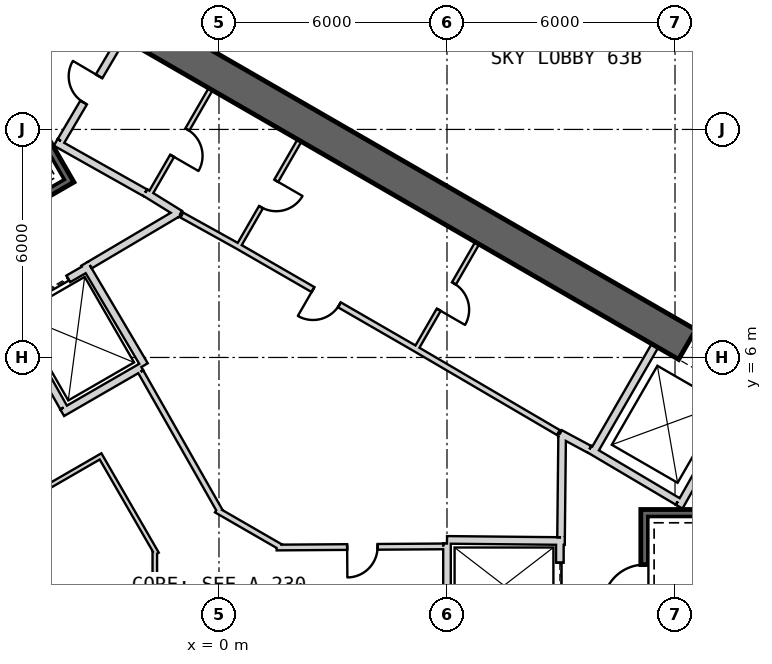
"""IFC4 building model, lengths in metres.
Left out: names, types, materials, properties, quantities, classifications, styles, units other than length and angle.
Written with IfcOpenShell. Run it as: python <this file> out.ifc"""

import sys

from ifc_helpers import new_model, si_unit, direction, frame, frame_2d, origin, place, context, subcontext, project, spatial, rectangle, extrude, element, fill, save


model = new_model("IFC4")
c1 = context("Model", 3, precision=1e-05, world=origin(), true_north=direction((0.0, 1.0)))
c2 = subcontext(c1, "Body", "Model", "MODEL_VIEW")
j1 = project(units=[si_unit("LENGTHUNIT", "METRE"), si_unit("PLANEANGLEUNIT", "RADIAN")], contexts=[c1])
p1 = place(None, origin())
s1 = spatial("IfcSite", under=j1, at=p1, CompositionType="ELEMENT")
p2 = place(p1, origin())
s2 = spatial("IfcBuilding", under=s1, at=p2, CompositionType="ELEMENT")
p3 = place(p2, frame((0.0, 0.0, 277.2)))
s3 = spatial("IfcBuildingStorey", under=s2, at=p3, CompositionType="ELEMENT", Elevation=277.2)
p4 = place(p3, frame((19.475, 2.208, 0.0), z_axis=(0.0, 0.0, 1.0), x_axis=(-0.866028369851, 0.499994862586, 0.0)))
e1 = element("IfcWall", 1, at=p4, inside=s3, PredefinedType="SHEAR", context=c2, shape_type="SweptSolid", body=[
    extrude(rectangle(XDim=31.523, YDim=0.9, at=frame_2d((15.762, 0.0))), origin(), (0.0, 0.0, 1.0), 6.5),
])
p5 = place(p4, frame((7.062, 0.0, 0.0)))
e2 = element("IfcOpeningElement", 2, at=p5, cuts=e1, PredefinedType="OPENING", context=c2, shape_type="SweptSolid", body=[
    extrude(rectangle(XDim=1.2, YDim=2.4, at=frame_2d((0.6, 1.2))), frame((0.0, 0.46, 0.0), z_axis=(0.0, -1.0, 0.0), x_axis=(1.0, 0.0, 0.0)), (0.0, 0.0, 1.0), 0.92),
])
p6 = place(p4, frame((3.612, 0.0, 0.0)))
e3 = element("IfcOpeningElement", 3, at=p6, cuts=e1, PredefinedType="OPENING", context=c2, shape_type="SweptSolid", body=[
    extrude(rectangle(XDim=1.2, YDim=2.4, at=frame_2d((0.6, 1.2))), frame((0.0, 0.46, 0.0), z_axis=(0.0, -1.0, 0.0), x_axis=(1.0, 0.0, 0.0)), (0.0, 0.0, 1.0), 0.92),
])
p7 = place(p4, frame((26.712, 0.0, 0.0)))
e4 = element("IfcOpeningElement", 4, at=p7, cuts=e1, PredefinedType="OPENING", context=c2, shape_type="SweptSolid", body=[
    extrude(rectangle(XDim=1.2, YDim=2.4, at=frame_2d((0.6, 1.2))), frame((0.0, 0.46, 0.0), z_axis=(0.0, -1.0, 0.0), x_axis=(1.0, 0.0, 0.0)), (0.0, 0.0, 1.0), 0.92),
])
p8 = place(p3, frame((9.847, 3.495, 0.0), z_axis=(0.0, 0.0, 1.0), x_axis=(0.499984717929, 0.866034226713, 0.0)))
e5 = element("IfcWall", 5, at=p8, inside=s3, PredefinedType="PLUMBINGWALL", context=c2, shape_type="SweptSolid", body=[
    extrude(rectangle(XDim=3.25, YDim=0.2, at=frame_2d((1.625, 0.0))), origin(), (0.0, 0.0, 1.0), 6.1),
])
p9 = place(p3, frame((12.11, 2.073, 0.0), z_axis=(0.0, 0.0, 1.0), x_axis=(0.49196600604, 0.870614408852, 0.0)))
e6 = element("IfcWall", 6, at=p9, inside=s3, PredefinedType="PLUMBINGWALL", context=c2, shape_type="SweptSolid", body=[
    extrude(rectangle(XDim=3.35, YDim=0.2, at=frame_2d((1.675, 0.0))), origin(), (0.0, 0.0, 1.0), 6.1),
])
p10 = place(p3, frame((12.073, 2.211, 0.0), z_axis=(0.0, 0.0, 1.0), x_axis=(-0.860414880418, 0.509594185166, 0.0)))
e7 = element("IfcWall", 7, at=p10, inside=s3, PredefinedType="PLUMBINGWALL", context=c2, shape_type="SweptSolid", body=[
    extrude(rectangle(XDim=2.7, YDim=0.2, at=frame_2d((1.35, 0.0))), origin(), (0.0, 0.0, 1.0), 6.1),
])
p11 = place(p3, frame((19.2, 1.9, -0.35), z_axis=(0.0, 0.0, 1.0), x_axis=(-1.0, 0.0, 0.0)))
e8 = element("IfcWall", 8, at=p11, inside=s3, PredefinedType="SHEAR", context=c2, shape_type="SweptSolid", body=[
    extrude(rectangle(XDim=8.1, YDim=0.2, at=frame_2d((4.05, 0.0))), origin(), (0.0, 0.0, 1.0), 6.45),
])
p12 = place(p3, frame((11.2, -1.8, -0.35), z_axis=(0.0, 0.0, 1.0), x_axis=(0.0, 1.0, 0.0)))
e9 = element("IfcWall", 9, at=p12, inside=s3, PredefinedType="SHEAR", context=c2, shape_type="SweptSolid", body=[
    extrude(rectangle(XDim=3.6, YDim=0.2, at=frame_2d((1.8, 0.0))), origin(), (0.0, 0.0, 1.0), 6.45),
])
p13 = place(p12, frame((1.25, 0.0, 0.35)))
e10 = element("IfcOpeningElement", 10, at=p13, cuts=e9, PredefinedType="OPENING", context=c2, shape_type="SweptSolid", body=[
    extrude(rectangle(XDim=1.1, YDim=2.1, at=frame_2d((0.55, 1.05))), frame((0.0, 0.11, 0.0), z_axis=(0.0, -1.0, 0.0), x_axis=(1.0, 0.0, 0.0)), (0.0, 0.0, 1.0), 0.22),
])
p14 = place(p3, frame((8.97, 1.2, 0.0), z_axis=(0.0, 0.0, 1.0), x_axis=(0.0, -1.0, 0.0)))
e11 = element("IfcWall", 11, at=p14, inside=s3, PredefinedType="PLUMBINGWALL", context=c2, shape_type="SweptSolid", body=[
    extrude(rectangle(XDim=2.4, YDim=0.2, at=frame_2d((1.2, 0.0))), origin(), (0.0, 0.0, 1.0), 6.1),
])
p15 = place(p14, frame((0.6, 0.0, 0.0)))
e12 = element("IfcOpeningElement", 12, at=p15, cuts=e11, PredefinedType="OPENING", context=c2, shape_type="SweptSolid", body=[
    extrude(rectangle(XDim=1.2, YDim=2.4, at=frame_2d((0.6, 1.2))), frame((0.0, 0.11, 0.0), z_axis=(0.0, -1.0, 0.0), x_axis=(1.0, 0.0, 0.0)), (0.0, 0.0, 1.0), 0.22),
])
p16 = place(p3, frame((6.0, 1.2, 0.0), z_axis=(0.0, 0.0, 1.0), x_axis=(0.999949988, -0.010001074852, 0.0)))
e13 = element("IfcWall", 13, at=p16, inside=s3, PredefinedType="PLUMBINGWALL", context=c2, shape_type="SweptSolid", body=[
    extrude(rectangle(XDim=3.1, YDim=0.2, at=frame_2d((1.55, 0.0))), origin(), (0.0, 0.0, 1.0), 6.1),
])
p17 = place(p3, frame((6.0, -1.1, 0.0), z_axis=(0.0, 0.0, 1.0), x_axis=(0.0, 1.0, 0.0)))
e14 = element("IfcWall", 14, at=p17, inside=s3, PredefinedType="PLUMBINGWALL", context=c2, shape_type="SweptSolid", body=[
    extrude(rectangle(XDim=2.205, YDim=0.2, at=frame_2d((1.102, 0.0))), origin(), (0.0, 0.0, 1.0), 6.1),
])
p18 = place(p3, frame((-7.854, 17.405, -0.35), z_axis=(0.0, 0.0, 1.0), x_axis=(0.499997992926, -0.866026562566, 0.0)))
e15 = element("IfcWall", 15, at=p18, inside=s3, PredefinedType="SHEAR", context=c2, shape_type="SweptSolid", body=[
    extrude(rectangle(XDim=7.9, YDim=0.2, at=frame_2d((3.95, 0.0))), origin(), (0.0, 0.0, 1.0), 6.45),
])
p19 = place(p3, frame((-7.159, 8.8, -0.35), z_axis=(0.0, 0.0, 1.0), x_axis=(0.866047807691, 0.499961193289, 0.0)))
e16 = element("IfcWall", 16, at=p19, inside=s3, PredefinedType="SHEAR", context=c2, shape_type="SweptSolid", body=[
    extrude(rectangle(XDim=3.6, YDim=0.2, at=frame_2d((1.8, 0.0))), origin(), (0.0, 0.0, 1.0), 6.45),
])
p20 = place(p19, frame((1.25, 0.0, 0.35)))
e17 = element("IfcOpeningElement", 17, at=p20, cuts=e16, PredefinedType="OPENING", context=c2, shape_type="SweptSolid", body=[
    extrude(rectangle(XDim=1.1, YDim=2.1, at=frame_2d((0.55, 1.05))), frame((0.0, 0.11, 0.0), z_axis=(0.0, -1.0, 0.0), x_axis=(1.0, 0.0, 0.0)), (0.0, 0.0, 1.0), 0.22),
])
p21 = place(p3, frame((-5.524, 7.168, 0.0), z_axis=(0.0, 0.0, 1.0), x_axis=(0.866024647952, 0.500001309137, 0.0)))
e18 = element("IfcWall", 18, at=p21, inside=s3, PredefinedType="PLUMBINGWALL", context=c2, shape_type="SweptSolid", body=[
    extrude(rectangle(XDim=2.4, YDim=0.2, at=frame_2d((1.2, 0.0))), origin(), (0.0, 0.0, 1.0), 6.1),
])
p22 = place(p21, frame((0.6, 0.0, 0.0)))
e19 = element("IfcOpeningElement", 19, at=p22, cuts=e18, PredefinedType="OPENING", context=c2, shape_type="SweptSolid", body=[
    extrude(rectangle(XDim=1.2, YDim=2.4, at=frame_2d((0.6, 1.2))), frame((0.0, 0.11, 0.0), z_axis=(0.0, -1.0, 0.0), x_axis=(1.0, 0.0, 0.0)), (0.0, 0.0, 1.0), 0.22),
])
p23 = place(p3, frame((-3.538, 8.465, 0.0), z_axis=(0.0, 0.0, 1.0), x_axis=(0.508647062354, -0.860975125052, 0.0)))
e20 = element("IfcWall", 20, at=p23, inside=s3, PredefinedType="PLUMBINGWALL", context=c2, shape_type="SweptSolid", body=[
    extrude(rectangle(XDim=3.1, YDim=0.2, at=frame_2d((1.55, 0.0))), origin(), (0.0, 0.0, 1.0), 6.1),
])
p24 = place(p3, frame((-2.043, 5.748, 0.0), z_axis=(0.0, 0.0, 1.0), x_axis=(-0.866035096217, -0.499983211839, 0.0)))
e21 = element("IfcWall", 21, at=p24, inside=s3, PredefinedType="PLUMBINGWALL", context=c2, shape_type="SweptSolid", body=[
    extrude(rectangle(XDim=2.404, YDim=0.2, at=frame_2d((1.202, 0.0))), origin(), (0.0, 0.0, 1.0), 6.1),
])
p25 = place(p3, frame((-5.562, 7.296, 0.0), z_axis=(0.0, 0.0, 1.0), x_axis=(0.49134651263, -0.870964180966, 0.0)))
e22 = element("IfcWall", 22, at=p25, inside=s3, PredefinedType="PLUMBINGWALL", context=c2, shape_type="SweptSolid", body=[
    extrude(rectangle(XDim=3.0, YDim=0.2, at=frame_2d((1.5, 0.0))), origin(), (0.0, 0.0, 1.0), 6.1),
])
p26 = place(p3, frame((6.795, 9.01, 0.0), z_axis=(0.0, 0.0, 1.0), x_axis=(-0.499984717929, -0.866034226713, 0.0)))
e23 = element("IfcWall", 23, at=p26, inside=s3, PredefinedType="PARTITIONING", context=c2, shape_type="SweptSolid", body=[
    extrude(rectangle(XDim=3.25, YDim=0.12, at=frame_2d((1.625, 0.0))), origin(), (0.0, 0.0, 1.0), 6.1),
])
p27 = place(p26, frame((1.225, 0.0, 0.0)))
e24 = element("IfcOpeningElement", 24, at=p27, cuts=e23, PredefinedType="OPENING", context=c2, shape_type="SweptSolid", body=[
    extrude(rectangle(XDim=0.8, YDim=2.1, at=frame_2d((0.4, 1.05))), frame((0.0, 0.07, 0.0), z_axis=(0.0, -1.0, 0.0), x_axis=(1.0, 0.0, 0.0)), (0.0, 0.0, 1.0), 0.14),
])
p28 = place(p3, frame((8.974, 3.999, 0.0), z_axis=(0.0, 0.0, 1.0), x_axis=(0.880917147855, -0.473270513147, 0.0)))
e25 = element("IfcWall", 25, at=p28, inside=s3, PredefinedType="PARTITIONING", context=c2, shape_type="SweptSolid", body=[
    extrude(rectangle(XDim=0.878, YDim=0.2, at=frame_2d((0.439, 0.0))), origin(), (0.0, 0.0, 1.0), 6.1),
])
p29 = place(p3, frame((8.931, 4.025, 0.0), z_axis=(0.0, 0.0, 1.0), x_axis=(-0.862666884027, 0.505772525157, 0.0)))
e26 = element("IfcWall", 26, at=p29, inside=s3, PredefinedType="PLUMBINGWALL", context=c2, shape_type="SweptSolid", body=[
    extrude(rectangle(XDim=4.372, YDim=0.15, at=frame_2d((2.186, 0.0))), origin(), (0.0, 0.0, 1.0), 6.1),
])
p30 = place(p3, frame((2.119, 11.709, 0.0), z_axis=(0.0, 0.0, 1.0), x_axis=(-0.500017246033, -0.866015446554, 0.0)))
e27 = element("IfcWall", 27, at=p30, inside=s3, PredefinedType="PARTITIONING", context=c2, shape_type="SweptSolid", body=[
    extrude(rectangle(XDim=3.25, YDim=0.12, at=frame_2d((1.625, 0.0))), origin(), (0.0, 0.0, 1.0), 6.1),
])
p31 = place(p30, frame((1.225, 0.0, 0.0)))
e28 = element("IfcOpeningElement", 28, at=p31, cuts=e27, PredefinedType="OPENING", context=c2, shape_type="SweptSolid", body=[
    extrude(rectangle(XDim=0.8, YDim=2.1, at=frame_2d((0.4, 1.05))), frame((0.0, 0.07, 0.0), z_axis=(0.0, -1.0, 0.0), x_axis=(1.0, 0.0, 0.0)), (0.0, 0.0, 1.0), 0.14),
])
p32 = place(p3, frame((5.159, 6.236, 0.0), z_axis=(0.0, 0.0, 1.0), x_axis=(-0.866028230842, 0.499995103361, 0.0)))
e29 = element("IfcWall", 29, at=p32, inside=s3, PredefinedType="PLUMBINGWALL", context=c2, shape_type="SweptSolid", body=[
    extrude(rectangle(XDim=5.4, YDim=0.15, at=frame_2d((2.7, 0.0))), origin(), (0.0, 0.0, 1.0), 6.1),
])
p33 = place(p32, frame((2.3, 0.0, 0.0)))
e30 = element("IfcOpeningElement", 30, at=p33, cuts=e29, PredefinedType="OPENING", context=c2, shape_type="SweptSolid", body=[
    extrude(rectangle(XDim=0.8, YDim=2.1, at=frame_2d((0.4, 1.05))), frame((0.0, 0.085, 0.0), z_axis=(0.0, -1.0, 0.0), x_axis=(1.0, 0.0, 0.0)), (0.0, 0.0, 1.0), 0.17),
])
p34 = place(p3, frame((-0.22, 13.06, 0.0), z_axis=(0.0, 0.0, 1.0), x_axis=(-0.499984717929, -0.866034226713, 0.0)))
e31 = element("IfcWall", 31, at=p34, inside=s3, PredefinedType="PARTITIONING", context=c2, shape_type="SweptSolid", body=[
    extrude(rectangle(XDim=3.25, YDim=0.12, at=frame_2d((1.625, 0.0))), origin(), (0.0, 0.0, 1.0), 6.1),
])
p35 = place(p34, frame((1.225, 0.0, 0.0)))
e32 = element("IfcOpeningElement", 32, at=p35, cuts=e31, PredefinedType="OPENING", context=c2, shape_type="SweptSolid", body=[
    extrude(rectangle(XDim=0.8, YDim=2.1, at=frame_2d((0.4, 1.05))), frame((0.0, 0.07, 0.0), z_axis=(0.0, -1.0, 0.0), x_axis=(1.0, 0.0, 0.0)), (0.0, 0.0, 1.0), 0.14),
])
p36 = place(p3, frame((-1.941, 10.339, 0.0), z_axis=(0.0, 0.0, 1.0), x_axis=(0.850216889117, -0.526432561171, 0.0)))
e33 = element("IfcWall", 33, at=p36, inside=s3, PredefinedType="PARTITIONING", context=c2, shape_type="SweptSolid", body=[
    extrude(rectangle(XDim=1.078, YDim=0.2, at=frame_2d((0.539, 0.0))), origin(), (0.0, 0.0, 1.0), 6.1),
])
p37 = place(p3, frame((0.483, 8.936, 0.0), z_axis=(0.0, 0.0, 1.0), x_axis=(-0.874315691004, 0.485357674776, 0.0)))
e34 = element("IfcWall", 34, at=p37, inside=s3, PredefinedType="PLUMBINGWALL", context=c2, shape_type="SweptSolid", body=[
    extrude(rectangle(XDim=1.671, YDim=0.15, at=frame_2d((0.836, 0.0))), origin(), (0.0, 0.0, 1.0), 6.1),
])
p38 = place(p3, frame((-4.296, 11.659, 0.0), z_axis=(0.0, 0.0, 1.0), x_axis=(0.871534483978, -0.490334215854, 0.0)))
e35 = element("IfcWall", 35, at=p38, inside=s3, PredefinedType="PARTITIONING", context=c2, shape_type="SweptSolid", body=[
    extrude(rectangle(XDim=2.7, YDim=0.2, at=frame_2d((1.35, 0.0))), origin(), (0.0, 0.0, 1.0), 6.1),
])
p39 = place(p3, frame((-2.558, 14.409, 0.0), z_axis=(0.0, 0.0, 1.0), x_axis=(-0.508018930956, -0.861345903683, 0.0)))
e36 = element("IfcWall", 36, at=p39, inside=s3, PredefinedType="PARTITIONING", context=c2, shape_type="SweptSolid", body=[
    extrude(rectangle(XDim=3.15, YDim=0.2, at=frame_2d((1.575, 0.0))), origin(), (0.0, 0.0, 1.0), 6.1),
])
p40 = place(p39, frame((1.175, 0.0, 0.0)))
e37 = element("IfcOpeningElement", 37, at=p40, cuts=e36, PredefinedType="OPENING", context=c2, shape_type="SweptSolid", body=[
    extrude(rectangle(XDim=0.8, YDim=2.1, at=frame_2d((0.4, 1.05))), frame((0.0, 0.11, 0.0), z_axis=(0.0, -1.0, 0.0), x_axis=(1.0, 0.0, 0.0)), (0.0, 0.0, 1.0), 0.22),
])
p41 = place(p3, frame((9.001, 1.27, 0.0), z_axis=(0.0, 0.0, 1.0), x_axis=(0.01074821465, 0.999942236273, 0.0)))
e38 = element("IfcWall", 38, at=p41, inside=s3, PredefinedType="PARTITIONING", context=c2, shape_type="SweptSolid", body=[
    extrude(rectangle(XDim=2.726, YDim=0.2, at=frame_2d((1.363, 0.0))), origin(), (0.0, 0.0, 1.0), 6.1),
])
p42 = place(p3, frame((-1.056, 9.818, 0.0), z_axis=(0.0, 0.0, 1.0), x_axis=(-0.860599924646, -0.509281621207, 0.0)))
e39 = element("IfcWall", 39, at=p42, inside=s3, PredefinedType="PARTITIONING", context=c2, shape_type="SweptSolid", body=[
    extrude(rectangle(XDim=2.725, YDim=0.2, at=frame_2d((1.362, 0.0))), origin(), (0.0, 0.0, 1.0), 6.1),
])
p43 = place(p3, frame((1.518, 0.999, 0.0), z_axis=(0.0, 0.0, 1.0), x_axis=(0.999976903524, 0.006796500403, 0.0)))
e40 = element("IfcWall", 40, at=p43, inside=s3, PredefinedType="PLUMBINGWALL", context=c2, shape_type="SweptSolid", body=[
    extrude(rectangle(XDim=4.382, YDim=0.15, at=frame_2d((2.191, 0.0))), origin(), (0.0, 0.0, 1.0), 6.1),
])
p44 = place(p43, frame((1.855, 0.0, 0.0)))
e41 = element("IfcOpeningElement", 41, at=p44, cuts=e40, PredefinedType="OPENING", context=c2, shape_type="SweptSolid", body=[
    extrude(rectangle(XDim=0.8, YDim=2.1, at=frame_2d((0.4, 1.05))), frame((0.0, 0.085, 0.0), z_axis=(0.0, -1.0, 0.0), x_axis=(1.0, 0.0, 0.0)), (0.0, 0.0, 1.0), 0.17),
])
p45 = place(p3, frame((-0.067, 1.989, 0.0), z_axis=(0.0, 0.0, 1.0), x_axis=(0.865981695925, -0.500075696594, 0.0)))
e42 = element("IfcWall", 42, at=p45, inside=s3, PredefinedType="PLUMBINGWALL", context=c2, shape_type="SweptSolid", body=[
    extrude(rectangle(XDim=1.954, YDim=0.15, at=frame_2d((0.977, 0.0))), origin(), (0.0, 0.0, 1.0), 6.1),
])
p46 = place(p3, frame((-2.059, 5.624, 0.0), z_axis=(0.0, 0.0, 1.0), x_axis=(0.494149180773, -0.869377125959, 0.0)))
e43 = element("IfcWall", 43, at=p46, inside=s3, PredefinedType="PLUMBINGWALL", context=c2, shape_type="SweptSolid", body=[
    extrude(rectangle(XDim=4.231, YDim=0.15, at=frame_2d((2.116, 0.0))), origin(), (0.0, 0.0, 1.0), 6.1),
])
p47 = place(p3, frame((-3.064, 3.427, 0.0), z_axis=(0.0, 0.0, 1.0), x_axis=(-0.866087547558, -0.499892348375, 0.0)))
e44 = element("IfcWall", 44, at=p47, inside=s3, PredefinedType="PARTITIONING", context=c2, shape_type="SweptSolid", body=[
    extrude(rectangle(XDim=1.7, YDim=0.12, at=frame_2d((0.85, 0.0))), origin(), (0.0, 0.0, 1.0), 6.1),
])
p48 = place(p3, frame((-1.637, 0.835, 0.0), z_axis=(0.0, 0.0, 1.0), x_axis=(-0.499980071345, 0.866036909293, 0.0)))
e45 = element("IfcWall", 45, at=p48, inside=s3, PredefinedType="PARTITIONING", context=c2, shape_type="SweptSolid", body=[
    extrude(rectangle(XDim=2.898, YDim=0.12, at=frame_2d((1.449, 0.0))), origin(), (0.0, 0.0, 1.0), 6.1),
])
p49 = place(p3, frame((-1.689, -1.029, 0.0), z_axis=(0.0, 0.0, 1.0), x_axis=(0.0, 1.0, 0.0)))
e46 = element("IfcWall", 46, at=p49, inside=s3, PredefinedType="PARTITIONING", context=c2, shape_type="SweptSolid", body=[
    extrude(rectangle(XDim=1.935, YDim=0.12, at=frame_2d((0.968, 0.0))), origin(), (0.0, 0.0, 1.0), 6.1),
])
p50 = place(p3, frame((25.695, 9.529, 0.0), z_axis=(0.0, 0.0, 1.0), x_axis=(-0.866021729263, 0.500006364403, 0.0)))
e47 = element("IfcWall", 47, at=p50, inside=s3, PredefinedType="PARTITIONING", context=c2, shape_type="SweptSolid", body=[
    extrude(rectangle(XDim=22.257, YDim=0.12, at=frame_2d((11.128, 0.0))), origin(), (0.0, 0.0, 1.0), 6.1),
])
p51 = place(p50, frame((6.86, 0.0, 0.0)))
e48 = element("IfcOpeningElement", 48, at=p51, cuts=e47, PredefinedType="OPENING", context=c2, shape_type="SweptSolid", body=[
    extrude(rectangle(XDim=1.0, YDim=2.1, at=frame_2d((0.5, 1.05))), frame((0.0, 0.07, 0.0), z_axis=(0.0, -1.0, 0.0), x_axis=(1.0, 0.0, 0.0)), (0.0, 0.0, 1.0), 0.14),
])
p52 = place(p50, frame((20.637, 0.0, 0.0)))
e49 = element("IfcOpeningElement", 49, at=p52, cuts=e47, PredefinedType="OPENING", context=c2, shape_type="SweptSolid", body=[
    extrude(rectangle(XDim=0.9, YDim=2.1, at=frame_2d((0.45, 1.05))), frame((0.0, 0.07, 0.0), z_axis=(0.0, -1.0, 0.0), x_axis=(1.0, 0.0, 0.0)), (0.0, 0.0, 1.0), 0.14),
])
p53 = place(p13, origin())
e50 = element("IfcDoor", 50, at=p53, inside=s3, OperationType="SINGLE_SWING_LEFT", PredefinedType="USERDEFINED", context=c2, shape_type="SweptSolid", body=[
    extrude(rectangle(XDim=1.1, YDim=2.1, at=frame_2d((0.55, 1.05))), frame((0.0, 0.025, 0.0), z_axis=(0.0, -1.0, 0.0), x_axis=(1.0, 0.0, 0.0)), (0.0, 0.0, 1.0), 0.05),
])
fill(e10, e50)
p54 = place(p15, origin())
e51 = element("IfcDoor", 51, at=p54, inside=s3, OperationType="SLIDING_TO_LEFT", PredefinedType="USERDEFINED", context=c2, shape_type="SweptSolid", body=[
    extrude(rectangle(XDim=1.2, YDim=2.4, at=frame_2d((0.6, 1.2))), frame((0.0, 0.025, 0.0), z_axis=(0.0, -1.0, 0.0), x_axis=(1.0, 0.0, 0.0)), (0.0, 0.0, 1.0), 0.05),
])
fill(e12, e51)
p55 = place(p22, origin())
e52 = element("IfcDoor", 52, at=p55, inside=s3, OperationType="SLIDING_TO_LEFT", PredefinedType="USERDEFINED", context=c2, shape_type="SweptSolid", body=[
    extrude(rectangle(XDim=1.2, YDim=2.4, at=frame_2d((0.6, 1.2))), frame((0.0, 0.025, 0.0), z_axis=(0.0, -1.0, 0.0), x_axis=(1.0, 0.0, 0.0)), (0.0, 0.0, 1.0), 0.05),
])
fill(e19, e52)
p56 = place(p44, origin())
e53 = element("IfcDoor", 53, at=p56, inside=s3, OperationType="SINGLE_SWING_LEFT", PredefinedType="USERDEFINED", context=c2, shape_type="SweptSolid", body=[
    extrude(rectangle(XDim=0.8, YDim=2.1, at=frame_2d((0.4, 1.05))), frame((0.0, 0.025, 0.0), z_axis=(0.0, -1.0, 0.0), x_axis=(1.0, 0.0, 0.0)), (0.0, 0.0, 1.0), 0.05),
])
fill(e41, e53)
p57 = place(p27, origin())
e54 = element("IfcDoor", 54, at=p57, inside=s3, OperationType="SINGLE_SWING_RIGHT", PredefinedType="USERDEFINED", context=c2, shape_type="SweptSolid", body=[
    extrude(rectangle(XDim=0.8, YDim=2.1, at=frame_2d((0.4, 1.05))), frame((0.0, 0.025, 0.0), z_axis=(0.0, -1.0, 0.0), x_axis=(1.0, 0.0, 0.0)), (0.0, 0.0, 1.0), 0.05),
])
fill(e24, e54)
p58 = place(p31, origin())
e55 = element("IfcDoor", 55, at=p58, inside=s3, OperationType="SINGLE_SWING_LEFT", PredefinedType="USERDEFINED", context=c2, shape_type="SweptSolid", body=[
    extrude(rectangle(XDim=0.8, YDim=2.1, at=frame_2d((0.4, 1.05))), frame((0.0, 0.025, 0.0), z_axis=(0.0, -1.0, 0.0), x_axis=(1.0, 0.0, 0.0)), (0.0, 0.0, 1.0), 0.05),
])
fill(e28, e55)
p59 = place(p40, origin())
e56 = element("IfcDoor", 56, at=p59, inside=s3, OperationType="SINGLE_SWING_LEFT", PredefinedType="USERDEFINED", context=c2, shape_type="SweptSolid", body=[
    extrude(rectangle(XDim=0.8, YDim=2.1, at=frame_2d((0.4, 1.05))), frame((0.0, 0.025, 0.0), z_axis=(0.0, -1.0, 0.0), x_axis=(1.0, 0.0, 0.0)), (0.0, 0.0, 1.0), 0.05),
])
fill(e37, e56)
p60 = place(p33, origin())
e57 = element("IfcDoor", 57, at=p60, inside=s3, OperationType="SINGLE_SWING_RIGHT", PredefinedType="USERDEFINED", context=c2, shape_type="SweptSolid", body=[
    extrude(rectangle(XDim=0.8, YDim=2.1, at=frame_2d((0.4, 1.05))), frame((0.0, 0.025, 0.0), z_axis=(0.0, -1.0, 0.0), x_axis=(1.0, 0.0, 0.0)), (0.0, 0.0, 1.0), 0.05),
])
fill(e30, e57)
p61 = place(p35, origin())
e58 = element("IfcDoor", 58, at=p61, inside=s3, OperationType="SINGLE_SWING_RIGHT", PredefinedType="USERDEFINED", context=c2, shape_type="SweptSolid", body=[
    extrude(rectangle(XDim=0.8, YDim=2.1, at=frame_2d((0.4, 1.05))), frame((0.0, 0.025, 0.0), z_axis=(0.0, -1.0, 0.0), x_axis=(1.0, 0.0, 0.0)), (0.0, 0.0, 1.0), 0.05),
])
fill(e32, e58)
p62 = place(p5, origin())
e59 = element("IfcDoor", 59, at=p62, inside=s3, OperationType="SLIDING_TO_LEFT", PredefinedType="USERDEFINED", context=c2, shape_type="SweptSolid", body=[
    extrude(rectangle(XDim=1.2, YDim=2.4, at=frame_2d((0.6, 1.2))), frame((0.0, 0.025, 0.0), z_axis=(0.0, -1.0, 0.0), x_axis=(1.0, 0.0, 0.0)), (0.0, 0.0, 1.0), 0.05),
])
fill(e2, e59)
save(model, sys.argv[1])
